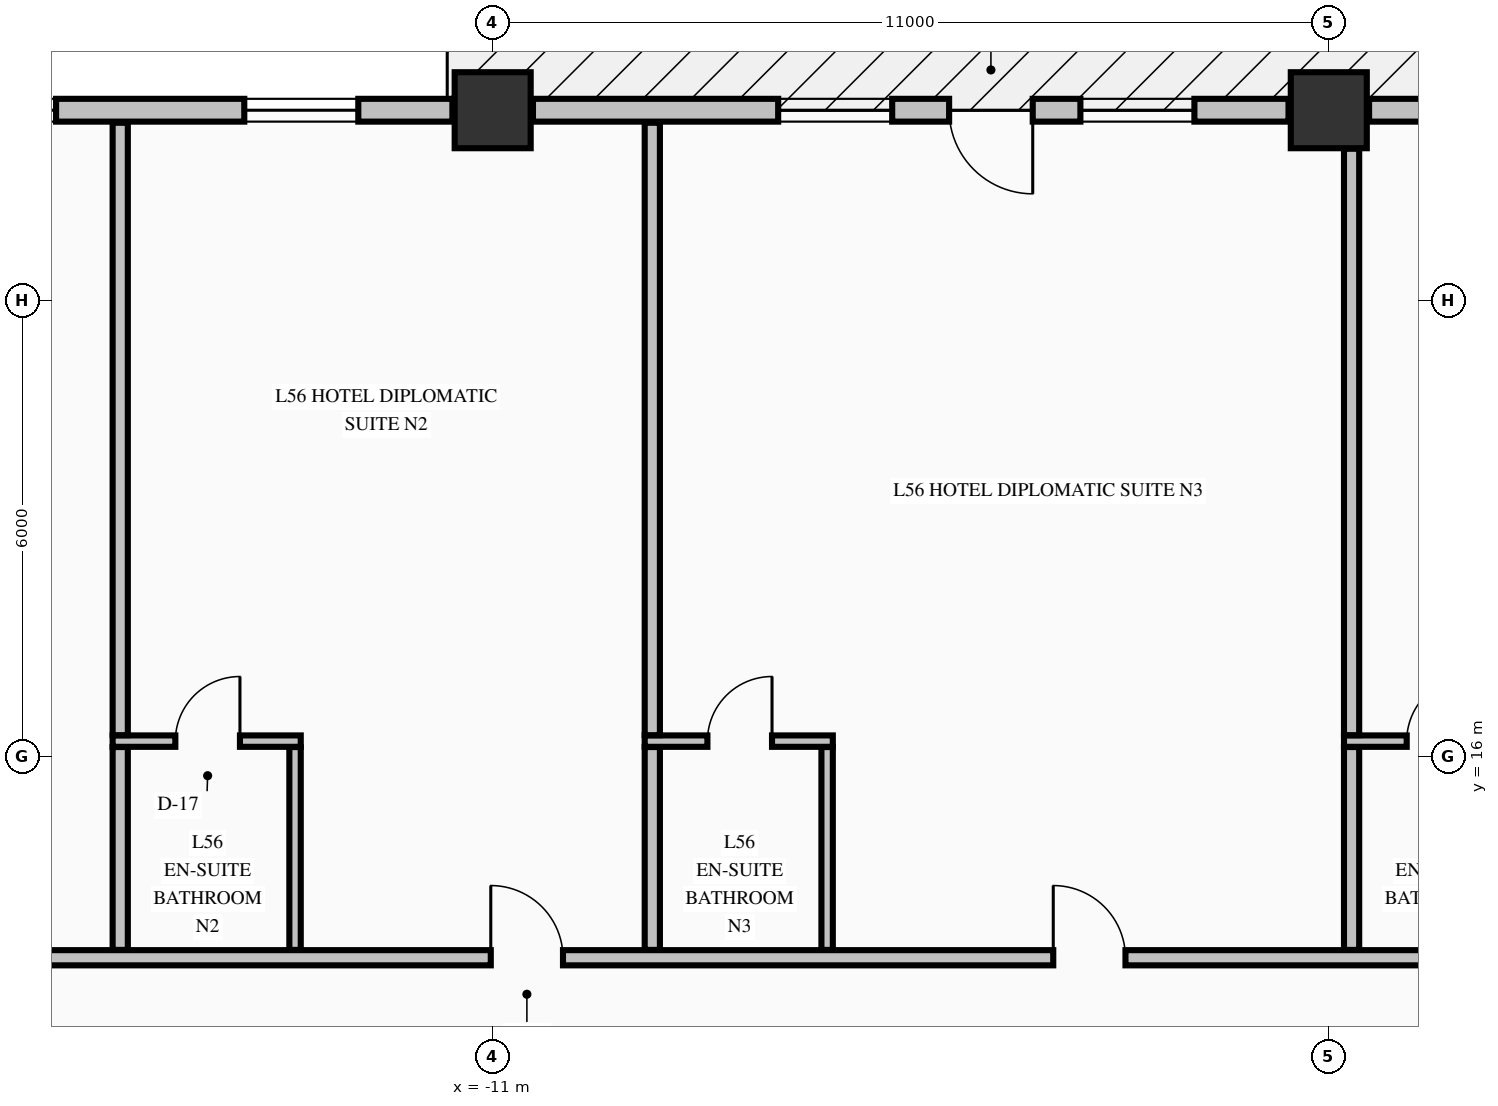
"""IFC4 building model, lengths in metres.
Left out: names, types, materials, properties, quantities, classifications, styles, units other than length and angle.
Written with IfcOpenShell. Run it as: python <this file> out.ifc"""

import sys

from ifc_helpers import new_model, si_unit, direction, frame, frame_2d, origin, origin_2d, place, context, subcontext, project, spatial, rectangle, extrude, element, fill, save


model = new_model("IFC4")
c1 = context("Model", 3, precision=1e-05, world=origin(), true_north=direction((0.0, 1.0)))
c2 = subcontext(c1, "Body", "Model", "MODEL_VIEW")
j1 = project(units=[si_unit("LENGTHUNIT", "METRE"), si_unit("PLANEANGLEUNIT", "RADIAN")], contexts=[c1])
p1 = place(None, origin())
s1 = spatial("IfcSite", under=j1, at=p1, CompositionType="ELEMENT")
p2 = place(p1, origin())
s2 = spatial("IfcBuilding", under=s1, at=p2, CompositionType="ELEMENT")
p3 = place(p2, frame((0.0, 0.0, 215.26)))
s3 = spatial("IfcBuildingStorey", under=s2, at=p3, CompositionType="ELEMENT", Elevation=215.26)
for number, where, z_axis, x_axis in (
    (1, (-11.0, 24.5, -0.25), (0.0, 0.0, 1.0), (1.0, 0.0, 0.0)),
    (2, (0.0, 24.5, -0.25), (0.0, 0.0, 1.0), (1.0, 0.0, 0.0)),
):
    element("IfcColumn", number, at=place(p3, frame(where, z_axis=z_axis, x_axis=x_axis)), inside=s3, PredefinedType="COLUMN", context=c2, shape_type="SweptSolid", body=[
        extrude(rectangle(XDim=1.0, YDim=1.0, at=origin_2d()), origin(), (0.0, 0.0, 1.0), 3.4),
    ])
p4 = place(p3, frame((-11.53, 24.5, 0.0), z_axis=(0.0, 0.0, 1.0), x_axis=(-1.0, 0.0, 0.0)))
e3 = element("IfcWall", 3, at=p4, inside=s3, PredefinedType="STANDARD", context=c2, shape_type="SweptSolid", body=[
    extrude(rectangle(XDim=9.94, YDim=0.3, at=frame_2d((4.97, 0.0))), origin(), (0.0, 0.0, 1.0), 2.542),
])
p5 = place(p4, frame((1.238, 0.0, 0.72)))
e4 = element("IfcOpeningElement", 4, at=p5, cuts=e3, PredefinedType="OPENING", context=c2, shape_type="SweptSolid", body=[
    extrude(rectangle(XDim=1.5, YDim=1.6, at=frame_2d((0.75, 0.8))), frame((0.0, 0.16, 0.0), z_axis=(0.0, -1.0, 0.0), x_axis=(1.0, 0.0, 0.0)), (0.0, 0.0, 1.0), 0.32),
])
p6 = place(p4, frame((5.214, 0.0, 0.72)))
e5 = element("IfcOpeningElement", 5, at=p6, cuts=e3, PredefinedType="OPENING", context=c2, shape_type="SweptSolid", body=[
    extrude(rectangle(XDim=1.5, YDim=1.6, at=frame_2d((0.75, 0.8))), frame((0.0, 0.16, 0.0), z_axis=(0.0, -1.0, 0.0), x_axis=(1.0, 0.0, 0.0)), (0.0, 0.0, 1.0), 0.32),
])
p7 = place(p3, frame((-0.53, 24.5, 0.0), z_axis=(0.0, 0.0, 1.0), x_axis=(-1.0, 0.0, 0.0)))
e6 = element("IfcWall", 6, at=p7, inside=s3, PredefinedType="STANDARD", context=c2, shape_type="SweptSolid", body=[
    extrude(rectangle(XDim=9.94, YDim=0.3, at=frame_2d((4.97, 0.0))), origin(), (0.0, 0.0, 1.0), 2.542),
])
p8 = place(p7, frame((3.365, 0.0, 0.0)))
e7 = element("IfcOpeningElement", 7, at=p8, cuts=e6, PredefinedType="OPENING", context=c2, shape_type="SweptSolid", body=[
    extrude(rectangle(XDim=1.1, YDim=2.15, at=frame_2d((0.55, 1.075))), frame((0.0, 0.16, 0.0), z_axis=(0.0, -1.0, 0.0), x_axis=(1.0, 0.0, 0.0)), (0.0, 0.0, 1.0), 0.32),
])
p9 = place(p7, frame((1.238, 0.0, 0.72)))
e8 = element("IfcOpeningElement", 8, at=p9, cuts=e6, PredefinedType="OPENING", context=c2, shape_type="SweptSolid", body=[
    extrude(rectangle(XDim=1.5, YDim=1.6, at=frame_2d((0.75, 0.8))), frame((0.0, 0.16, 0.0), z_axis=(0.0, -1.0, 0.0), x_axis=(1.0, 0.0, 0.0)), (0.0, 0.0, 1.0), 0.32),
])
p10 = place(p7, frame((5.214, 0.0, 0.72)))
e9 = element("IfcOpeningElement", 9, at=p10, cuts=e6, PredefinedType="OPENING", context=c2, shape_type="SweptSolid", body=[
    extrude(rectangle(XDim=1.5, YDim=1.6, at=frame_2d((0.75, 0.8))), frame((0.0, 0.16, 0.0), z_axis=(0.0, -1.0, 0.0), x_axis=(1.0, 0.0, 0.0)), (0.0, 0.0, 1.0), 0.32),
])
p11 = place(p3, frame((10.47, 24.5, 0.0), z_axis=(0.0, 0.0, 1.0), x_axis=(-1.0, 0.0, 0.0)))
e10 = element("IfcWall", 10, at=p11, inside=s3, PredefinedType="STANDARD", context=c2, shape_type="SweptSolid", body=[
    extrude(rectangle(XDim=9.94, YDim=0.3, at=frame_2d((4.97, 0.0))), origin(), (0.0, 0.0, 1.0), 2.542),
])
p12 = place(p11, frame((1.238, 0.0, 0.72)))
e11 = element("IfcOpeningElement", 11, at=p12, cuts=e10, PredefinedType="OPENING", context=c2, shape_type="SweptSolid", body=[
    extrude(rectangle(XDim=1.5, YDim=1.6, at=frame_2d((0.75, 0.8))), frame((0.0, 0.16, 0.0), z_axis=(0.0, -1.0, 0.0), x_axis=(1.0, 0.0, 0.0)), (0.0, 0.0, 1.0), 0.32),
])
p13 = place(p11, frame((5.214, 0.0, 0.72)))
e12 = element("IfcOpeningElement", 12, at=p13, cuts=e10, PredefinedType="OPENING", context=c2, shape_type="SweptSolid", body=[
    extrude(rectangle(XDim=1.5, YDim=1.6, at=frame_2d((0.75, 0.8))), frame((0.0, 0.16, 0.0), z_axis=(0.0, -1.0, 0.0), x_axis=(1.0, 0.0, 0.0)), (0.0, 0.0, 1.0), 0.32),
])
p14 = place(p11, frame((7.202, 0.0, 0.72)))
e13 = element("IfcOpeningElement", 13, at=p14, cuts=e10, PredefinedType="OPENING", context=c2, shape_type="SweptSolid", body=[
    extrude(rectangle(XDim=1.5, YDim=1.6, at=frame_2d((0.75, 0.8))), frame((0.0, 0.16, 0.0), z_axis=(0.0, -1.0, 0.0), x_axis=(1.0, 0.0, 0.0)), (0.0, 0.0, 1.0), 0.32),
])
p15 = place(p3, frame((-22.1, 13.35, 0.0), z_axis=(0.0, 0.0, 1.0), x_axis=(1.0, 0.0, 0.0)))
e14 = element("IfcWall", 14, at=p15, inside=s3, PredefinedType="PARTITIONING", context=c2, shape_type="SweptSolid", body=[
    extrude(rectangle(XDim=39.2, YDim=0.2, at=frame_2d((19.6, 0.0))), origin(), (0.0, 0.0, 1.0), 3.15),
])
p16 = place(p15, frame((3.825, 0.0, 0.0)))
e15 = element("IfcOpeningElement", 15, at=p16, cuts=e14, PredefinedType="OPENING", context=c2, shape_type="SweptSolid", body=[
    extrude(rectangle(XDim=0.95, YDim=2.15, at=frame_2d((0.475, 1.075))), frame((0.0, 0.11, 0.0), z_axis=(0.0, -1.0, 0.0), x_axis=(1.0, 0.0, 0.0)), (0.0, 0.0, 1.0), 0.22),
])
p17 = place(p15, frame((11.075, 0.0, 0.0)))
e16 = element("IfcOpeningElement", 16, at=p17, cuts=e14, PredefinedType="OPENING", context=c2, shape_type="SweptSolid", body=[
    extrude(rectangle(XDim=0.95, YDim=2.15, at=frame_2d((0.475, 1.075))), frame((0.0, 0.11, 0.0), z_axis=(0.0, -1.0, 0.0), x_axis=(1.0, 0.0, 0.0)), (0.0, 0.0, 1.0), 0.22),
])
p18 = place(p15, frame((18.475, 0.0, 0.0)))
e17 = element("IfcOpeningElement", 17, at=p18, cuts=e14, PredefinedType="OPENING", context=c2, shape_type="SweptSolid", body=[
    extrude(rectangle(XDim=0.95, YDim=2.15, at=frame_2d((0.475, 1.075))), frame((0.0, 0.11, 0.0), z_axis=(0.0, -1.0, 0.0), x_axis=(1.0, 0.0, 0.0)), (0.0, 0.0, 1.0), 0.22),
])
p19 = place(p15, frame((26.475, 0.0, 0.0)))
e18 = element("IfcOpeningElement", 18, at=p19, cuts=e14, PredefinedType="OPENING", context=c2, shape_type="SweptSolid", body=[
    extrude(rectangle(XDim=0.95, YDim=2.15, at=frame_2d((0.475, 1.075))), frame((0.0, 0.11, 0.0), z_axis=(0.0, -1.0, 0.0), x_axis=(1.0, 0.0, 0.0)), (0.0, 0.0, 1.0), 0.22),
])
p20 = place(p15, frame((34.825, 0.0, 0.0)))
e19 = element("IfcOpeningElement", 19, at=p20, cuts=e14, PredefinedType="OPENING", context=c2, shape_type="SweptSolid", body=[
    extrude(rectangle(XDim=0.95, YDim=2.15, at=frame_2d((0.475, 1.075))), frame((0.0, 0.11, 0.0), z_axis=(0.0, -1.0, 0.0), x_axis=(1.0, 0.0, 0.0)), (0.0, 0.0, 1.0), 0.22),
])
p21 = place(p3, frame((-16.0, 16.2, 0.0), z_axis=(0.0, 0.0, 1.0), x_axis=(1.0, 0.0, 0.0)))
e20 = element("IfcWall", 20, at=p21, inside=s3, PredefinedType="PARTITIONING", context=c2, shape_type="SweptSolid", body=[
    extrude(rectangle(XDim=2.475, YDim=0.15, at=frame_2d((1.238, 0.0))), origin(), (0.0, 0.0, 1.0), 3.15),
])
p22 = place(p21, frame((0.825, 0.0, 0.0)))
e21 = element("IfcOpeningElement", 21, at=p22, cuts=e20, PredefinedType="OPENING", context=c2, shape_type="SweptSolid", body=[
    extrude(rectangle(XDim=0.85, YDim=2.1, at=frame_2d((0.425, 1.05))), frame((0.0, 0.085, 0.0), z_axis=(0.0, -1.0, 0.0), x_axis=(1.0, 0.0, 0.0)), (0.0, 0.0, 1.0), 0.17),
])
p23 = place(p3, frame((-9.0, 16.2, 0.0), z_axis=(0.0, 0.0, 1.0), x_axis=(1.0, 0.0, 0.0)))
e22 = element("IfcWall", 22, at=p23, inside=s3, PredefinedType="PARTITIONING", context=c2, shape_type="SweptSolid", body=[
    extrude(rectangle(XDim=2.475, YDim=0.15, at=frame_2d((1.238, 0.0))), origin(), (0.0, 0.0, 1.0), 3.15),
])
p24 = place(p23, frame((0.825, 0.0, 0.0)))
e23 = element("IfcOpeningElement", 23, at=p24, cuts=e22, PredefinedType="OPENING", context=c2, shape_type="SweptSolid", body=[
    extrude(rectangle(XDim=0.85, YDim=2.1, at=frame_2d((0.425, 1.05))), frame((0.0, 0.085, 0.0), z_axis=(0.0, -1.0, 0.0), x_axis=(1.0, 0.0, 0.0)), (0.0, 0.0, 1.0), 0.17),
])
p25 = place(p3, frame((0.2, 16.2, 0.0), z_axis=(0.0, 0.0, 1.0), x_axis=(1.0, 0.0, 0.0)))
e24 = element("IfcWall", 24, at=p25, inside=s3, PredefinedType="PARTITIONING", context=c2, shape_type="SweptSolid", body=[
    extrude(rectangle(XDim=2.475, YDim=0.15, at=frame_2d((1.238, 0.0))), origin(), (0.0, 0.0, 1.0), 3.15),
])
p26 = place(p25, frame((0.825, 0.0, 0.0)))
e25 = element("IfcOpeningElement", 25, at=p26, cuts=e24, PredefinedType="OPENING", context=c2, shape_type="SweptSolid", body=[
    extrude(rectangle(XDim=0.85, YDim=2.1, at=frame_2d((0.425, 1.05))), frame((0.0, 0.085, 0.0), z_axis=(0.0, -1.0, 0.0), x_axis=(1.0, 0.0, 0.0)), (0.0, 0.0, 1.0), 0.17),
])
p27 = place(p3, frame((-15.9, 13.453, 0.0), z_axis=(0.0, 0.0, 1.0), x_axis=(0.0, 1.0, 0.0)))
e26 = element("IfcWall", 26, at=p27, inside=s3, PredefinedType="PARTITIONING", context=c2, shape_type="SweptSolid", body=[
    extrude(rectangle(XDim=2.669, YDim=0.2, at=frame_2d((1.334, 0.0))), origin(), (0.0, 0.0, 1.0), 3.15),
])
p28 = place(p3, frame((-15.9, 16.278, 0.0), z_axis=(0.0, 0.0, 1.0), x_axis=(0.0, 1.0, 0.0)))
e27 = element("IfcWall", 27, at=p28, inside=s3, PredefinedType="PARTITIONING", context=c2, shape_type="SweptSolid", body=[
    extrude(rectangle(XDim=8.057, YDim=0.2, at=frame_2d((4.028, 0.0))), origin(), (0.0, 0.0, 1.0), 3.15),
])
p29 = place(p3, frame((-13.6, 13.453, 0.0), z_axis=(0.0, 0.0, 1.0), x_axis=(0.0, 1.0, 0.0)))
e28 = element("IfcWall", 28, at=p29, inside=s3, PredefinedType="PARTITIONING", context=c2, shape_type="SweptSolid", body=[
    extrude(rectangle(XDim=2.669, YDim=0.15, at=frame_2d((1.334, 0.0))), origin(), (0.0, 0.0, 1.0), 3.15),
])
p30 = place(p3, frame((-8.9, 13.453, 0.0), z_axis=(0.0, 0.0, 1.0), x_axis=(0.0, 1.0, 0.0)))
e29 = element("IfcWall", 29, at=p30, inside=s3, PredefinedType="PARTITIONING", context=c2, shape_type="SweptSolid", body=[
    extrude(rectangle(XDim=2.669, YDim=0.2, at=frame_2d((1.334, 0.0))), origin(), (0.0, 0.0, 1.0), 3.15),
])
p31 = place(p3, frame((-8.9, 16.278, 0.0), z_axis=(0.0, 0.0, 1.0), x_axis=(0.0, 1.0, 0.0)))
e30 = element("IfcWall", 30, at=p31, inside=s3, PredefinedType="PARTITIONING", context=c2, shape_type="SweptSolid", body=[
    extrude(rectangle(XDim=8.057, YDim=0.2, at=frame_2d((4.028, 0.0))), origin(), (0.0, 0.0, 1.0), 3.15),
])
p32 = place(p3, frame((-6.6, 13.453, 0.0), z_axis=(0.0, 0.0, 1.0), x_axis=(0.0, 1.0, 0.0)))
e31 = element("IfcWall", 31, at=p32, inside=s3, PredefinedType="PARTITIONING", context=c2, shape_type="SweptSolid", body=[
    extrude(rectangle(XDim=2.669, YDim=0.15, at=frame_2d((1.334, 0.0))), origin(), (0.0, 0.0, 1.0), 3.15),
])
p33 = place(p3, frame((0.3, 13.453, 0.0), z_axis=(0.0, 0.0, 1.0), x_axis=(0.0, 1.0, 0.0)))
e32 = element("IfcWall", 32, at=p33, inside=s3, PredefinedType="PARTITIONING", context=c2, shape_type="SweptSolid", body=[
    extrude(rectangle(XDim=2.669, YDim=0.2, at=frame_2d((1.334, 0.0))), origin(), (0.0, 0.0, 1.0), 2.342),
])
p34 = place(p3, frame((0.3, 16.278, 0.0), z_axis=(0.0, 0.0, 1.0), x_axis=(0.0, 1.0, 0.0)))
e33 = element("IfcWall", 33, at=p34, inside=s3, PredefinedType="PARTITIONING", context=c2, shape_type="SweptSolid", body=[
    extrude(rectangle(XDim=7.716, YDim=0.2, at=frame_2d((3.858, 0.0))), origin(), (0.0, 0.0, 1.0), 2.342),
])
p35 = place(p5, origin())
e34 = element("IfcWindow", 34, at=p35, inside=s3, PartitioningType="SINGLE_PANEL", PredefinedType="WINDOW", context=c2, shape_type="SweptSolid", body=[
    extrude(rectangle(XDim=1.5, YDim=1.6, at=frame_2d((0.75, 0.8))), frame((0.0, 0.03, 0.0), z_axis=(0.0, -1.0, 0.0), x_axis=(1.0, 0.0, 0.0)), (0.0, 0.0, 1.0), 0.06),
])
fill(e4, e34)
p36 = place(p6, origin())
e35 = element("IfcWindow", 35, at=p36, inside=s3, PartitioningType="SINGLE_PANEL", PredefinedType="WINDOW", context=c2, shape_type="SweptSolid", body=[
    extrude(rectangle(XDim=1.5, YDim=1.6, at=frame_2d((0.75, 0.8))), frame((0.0, 0.03, 0.0), z_axis=(0.0, -1.0, 0.0), x_axis=(1.0, 0.0, 0.0)), (0.0, 0.0, 1.0), 0.06),
])
fill(e5, e35)
p37 = place(p8, origin())
e36 = element("IfcDoor", 36, at=p37, inside=s3, OperationType="SINGLE_SWING_LEFT", PredefinedType="DOOR", context=c2, shape_type="SweptSolid", body=[
    extrude(rectangle(XDim=1.1, YDim=2.15, at=frame_2d((0.55, 1.075))), frame((0.0, 0.025, 0.0), z_axis=(0.0, -1.0, 0.0), x_axis=(1.0, 0.0, 0.0)), (0.0, 0.0, 1.0), 0.05),
])
fill(e7, e36)
p38 = place(p9, origin())
e37 = element("IfcWindow", 37, at=p38, inside=s3, PartitioningType="SINGLE_PANEL", PredefinedType="WINDOW", context=c2, shape_type="SweptSolid", body=[
    extrude(rectangle(XDim=1.5, YDim=1.6, at=frame_2d((0.75, 0.8))), frame((0.0, 0.03, 0.0), z_axis=(0.0, -1.0, 0.0), x_axis=(1.0, 0.0, 0.0)), (0.0, 0.0, 1.0), 0.06),
])
fill(e8, e37)
p39 = place(p10, origin())
e38 = element("IfcWindow", 38, at=p39, inside=s3, PartitioningType="SINGLE_PANEL", PredefinedType="WINDOW", context=c2, shape_type="SweptSolid", body=[
    extrude(rectangle(XDim=1.5, YDim=1.6, at=frame_2d((0.75, 0.8))), frame((0.0, 0.03, 0.0), z_axis=(0.0, -1.0, 0.0), x_axis=(1.0, 0.0, 0.0)), (0.0, 0.0, 1.0), 0.06),
])
fill(e9, e38)
p40 = place(p17, origin())
e39 = element("IfcDoor", 39, at=p40, inside=s3, OperationType="SINGLE_SWING_LEFT", PredefinedType="DOOR", context=c2, shape_type="SweptSolid", body=[
    extrude(rectangle(XDim=0.95, YDim=2.15, at=frame_2d((0.475, 1.075))), frame((0.0, 0.025, 0.0), z_axis=(0.0, -1.0, 0.0), x_axis=(1.0, 0.0, 0.0)), (0.0, 0.0, 1.0), 0.05),
])
fill(e16, e39)
p41 = place(p22, origin())
e40 = element("IfcDoor", 40, at=p41, inside=s3, OperationType="SINGLE_SWING_RIGHT", PredefinedType="DOOR", context=c2, shape_type="SweptSolid", body=[
    extrude(rectangle(XDim=0.85, YDim=2.1, at=frame_2d((0.425, 1.05))), frame((0.0, 0.025, 0.0), z_axis=(0.0, -1.0, 0.0), x_axis=(1.0, 0.0, 0.0)), (0.0, 0.0, 1.0), 0.05),
])
fill(e21, e40)
p42 = place(p18, origin())
e41 = element("IfcDoor", 41, at=p42, inside=s3, OperationType="SINGLE_SWING_LEFT", PredefinedType="DOOR", context=c2, shape_type="SweptSolid", body=[
    extrude(rectangle(XDim=0.95, YDim=2.15, at=frame_2d((0.475, 1.075))), frame((0.0, 0.025, 0.0), z_axis=(0.0, -1.0, 0.0), x_axis=(1.0, 0.0, 0.0)), (0.0, 0.0, 1.0), 0.05),
])
fill(e17, e41)
p43 = place(p24, origin())
e42 = element("IfcDoor", 42, at=p43, inside=s3, OperationType="SINGLE_SWING_RIGHT", PredefinedType="DOOR", context=c2, shape_type="SweptSolid", body=[
    extrude(rectangle(XDim=0.85, YDim=2.1, at=frame_2d((0.425, 1.05))), frame((0.0, 0.025, 0.0), z_axis=(0.0, -1.0, 0.0), x_axis=(1.0, 0.0, 0.0)), (0.0, 0.0, 1.0), 0.05),
])
fill(e23, e42)
p44 = place(p26, origin())
e43 = element("IfcDoor", 43, at=p44, inside=s3, OperationType="SINGLE_SWING_RIGHT", PredefinedType="DOOR", context=c2, shape_type="SweptSolid", body=[
    extrude(rectangle(XDim=0.85, YDim=2.1, at=frame_2d((0.425, 1.05))), frame((0.0, 0.025, 0.0), z_axis=(0.0, -1.0, 0.0), x_axis=(1.0, 0.0, 0.0)), (0.0, 0.0, 1.0), 0.05),
])
fill(e25, e43)
save(model, sys.argv[1])
